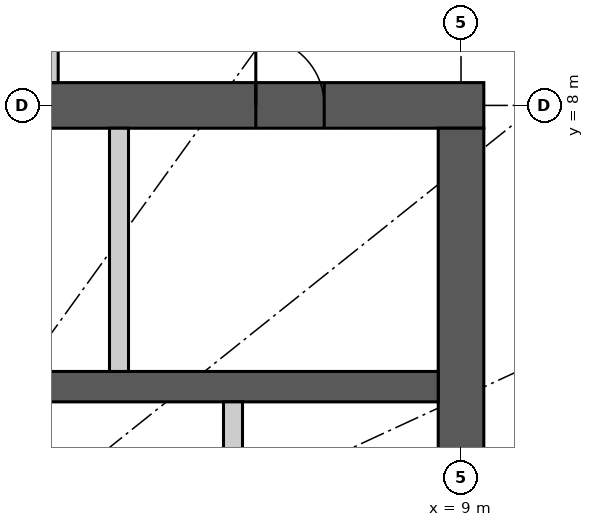
"""IFC4 building model, lengths in metres.
Left out: names, types, materials, properties, quantities, classifications, styles, units other than length and angle.
Written with IfcOpenShell. Run it as: python <this file> out.ifc"""

import sys

from ifc_helpers import new_model, si_unit, direction, frame, frame_2d, origin, place, context, subcontext, project, spatial, rectangle, extrude, element, fill, save


model = new_model("IFC4")
c1 = context("Model", 3, precision=1e-05, world=origin(), true_north=direction((0.0, 1.0)))
c2 = subcontext(c1, "Body", "Model", "MODEL_VIEW")
j1 = project(units=[si_unit("LENGTHUNIT", "METRE"), si_unit("PLANEANGLEUNIT", "RADIAN")], contexts=[c1])
p1 = place(None, origin())
s1 = spatial("IfcSite", under=j1, at=p1, CompositionType="ELEMENT")
p2 = place(p1, origin())
s2 = spatial("IfcBuilding", under=s1, at=p2, CompositionType="ELEMENT")
p3 = place(p2, frame((0.0, 0.0, 237.3)))
s3 = spatial("IfcBuildingStorey", under=s2, at=p3, CompositionType="ELEMENT", Elevation=237.3)
p4 = place(p3, frame((-9.3, 8.0, 0.0), z_axis=(0.0, 0.0, 1.0), x_axis=(1.0, 0.0, 0.0)))
e1 = element("IfcWall", 1, at=p4, inside=s3, PredefinedType="SHEAR", context=c2, shape_type="SweptSolid", body=[
    extrude(rectangle(XDim=18.6, YDim=0.6, at=frame_2d((9.3, 0.0))), origin(), (0.0, 0.0, 1.0), 5.4),
])
p5 = place(p4, frame((8.0, 0.0, 0.0)))
e2 = element("IfcOpeningElement", 2, at=p5, cuts=e1, PredefinedType="OPENING", context=c2, shape_type="SweptSolid", body=[
    extrude(rectangle(XDim=1.2, YDim=2.2, at=frame_2d((0.6, 1.1))), frame((0.0, 0.31, 0.0), z_axis=(0.0, -1.0, 0.0), x_axis=(1.0, 0.0, 0.0)), (0.0, 0.0, 1.0), 0.62),
])
p6 = place(p4, frame((15.6, 0.0, 0.0)))
e3 = element("IfcOpeningElement", 3, at=p6, cuts=e1, PredefinedType="OPENING", context=c2, shape_type="SweptSolid", body=[
    extrude(rectangle(XDim=0.9, YDim=2.2, at=frame_2d((0.45, 1.1))), frame((0.0, 0.31, 0.0), z_axis=(0.0, -1.0, 0.0), x_axis=(1.0, 0.0, 0.0)), (0.0, 0.0, 1.0), 0.62),
])
p7 = place(p3, frame((9.0, -7.7, 0.0), z_axis=(0.0, 0.0, 1.0), x_axis=(0.0, 1.0, 0.0)))
e4 = element("IfcWall", 4, at=p7, inside=s3, PredefinedType="SHEAR", context=c2, shape_type="SweptSolid", body=[
    extrude(rectangle(XDim=15.4, YDim=0.6, at=frame_2d((7.7, 0.0))), origin(), (0.0, 0.0, 1.0), 5.4),
])
p8 = place(p7, frame((6.8, 0.0, 0.0)))
e5 = element("IfcOpeningElement", 5, at=p8, cuts=e4, PredefinedType="OPENING", context=c2, shape_type="SweptSolid", body=[
    extrude(rectangle(XDim=1.8, YDim=2.2, at=frame_2d((0.9, 1.1))), frame((0.0, 0.31, 0.0), z_axis=(0.0, -1.0, 0.0), x_axis=(1.0, 0.0, 0.0)), (0.0, 0.0, 1.0), 0.62),
])
p9 = place(p3, frame((-8.7, 4.3, 0.0), z_axis=(0.0, 0.0, 1.0), x_axis=(1.0, 0.0, 0.0)))
e6 = element("IfcWall", 6, at=p9, inside=s3, PredefinedType="SHEAR", context=c2, shape_type="SweptSolid", body=[
    extrude(rectangle(XDim=17.4, YDim=0.4, at=frame_2d((8.7, 0.0))), origin(), (0.0, 0.0, 1.0), 5.4),
])
p10 = place(p3, frame((4.5, 4.5, 0.0), z_axis=(0.0, 0.0, 1.0), x_axis=(0.0, 1.0, 0.0)))
e7 = element("IfcWall", 7, at=p10, inside=s3, PredefinedType="PARTITIONING", context=c2, shape_type="SweptSolid", body=[
    extrude(rectangle(XDim=3.2, YDim=0.25, at=frame_2d((1.6, 0.0))), origin(), (0.0, 0.0, 1.0), 5.4),
])
p11 = place(p3, frame((6.0, 1.75, 0.0), z_axis=(0.0, 0.0, 1.0), x_axis=(0.0, 1.0, 0.0)))
e8 = element("IfcWall", 8, at=p11, inside=s3, PredefinedType="PARTITIONING", context=c2, shape_type="SweptSolid", body=[
    extrude(rectangle(XDim=2.35, YDim=0.25, at=frame_2d((1.175, 0.0))), origin(), (0.0, 0.0, 1.0), 5.4),
])
p12 = place(p3, frame((3.6, 8.3, 0.0), z_axis=(0.0, 0.0, 1.0), x_axis=(0.0, 1.0, 0.0)))
e9 = element("IfcWall", 9, at=p12, inside=s3, PredefinedType="PARTITIONING", context=c2, shape_type="SweptSolid", body=[
    extrude(rectangle(XDim=1.8, YDim=0.2, at=frame_2d((0.9, 0.0))), origin(), (0.0, 0.0, 1.0), 5.15),
])
p13 = place(p6, origin())
e10 = element("IfcDoor", 10, at=p13, inside=s3, OperationType="SINGLE_SWING_LEFT", PredefinedType="DOOR", context=c2, shape_type="SweptSolid", body=[
    extrude(rectangle(XDim=0.9, YDim=2.2, at=frame_2d((0.45, 1.1))), frame((0.0, 0.025, 0.0), z_axis=(0.0, -1.0, 0.0), x_axis=(1.0, 0.0, 0.0)), (0.0, 0.0, 1.0), 0.05),
])
fill(e3, e10)
save(model, sys.argv[1])
